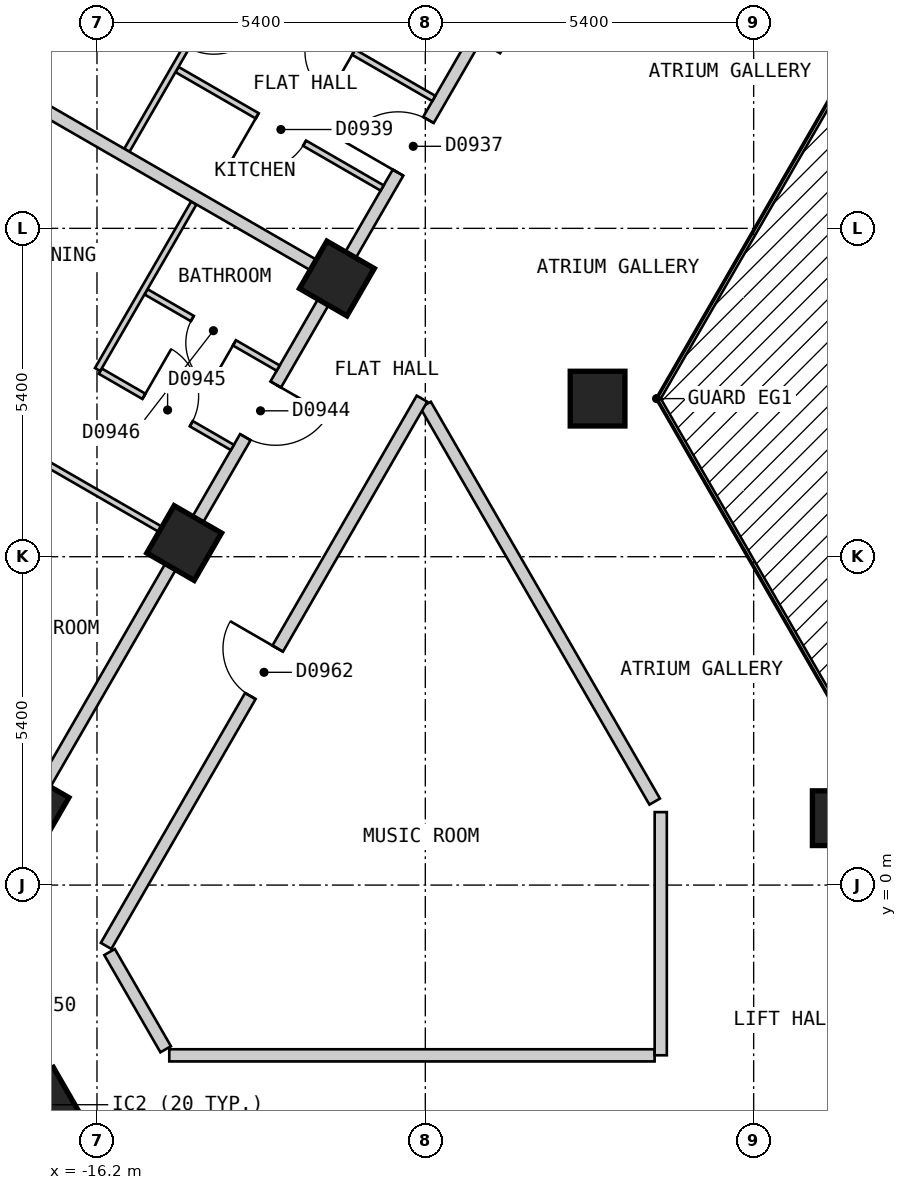
"""IFC4 building model, lengths in metres.
Left out: names, types, materials, properties, quantities, classifications, styles, units other than length and angle.
Written with IfcOpenShell. Run it as: python <this file> out.ifc"""

import sys

from ifc_helpers import new_model, si_unit, direction, frame, frame_2d, origin, origin_2d, place, context, subcontext, project, spatial, polyline, rectangle, outline, extrude, element, fill, save


model = new_model("IFC4")
c1 = context("Model", 3, precision=1e-05, world=origin(), true_north=direction((0.0, 1.0)))
c2 = subcontext(c1, "Body", "Model", "MODEL_VIEW")
j1 = project(units=[si_unit("LENGTHUNIT", "METRE"), si_unit("PLANEANGLEUNIT", "RADIAN")], contexts=[c1])
p1 = place(None, origin())
s1 = spatial("IfcSite", under=j1, at=p1, CompositionType="ELEMENT")
p2 = place(p1, origin())
s2 = spatial("IfcBuilding", under=s1, at=p2, CompositionType="ELEMENT")
p3 = place(p2, frame((0.0, 0.0, 102.0)))
s3 = spatial("IfcBuildingStorey", under=s2, at=p3, CompositionType="ELEMENT", Elevation=102.0)
for number, where, z_axis, x_axis in (
    (1, (-17.083, -3.612, 0.0), (0.0, 0.0, 1.0), (0.5, -0.866, 0.0)),
    (2, (-7.967, 8.0, 0.0), (0.0, 0.0, 1.0), (1.0, 0.0, 0.0)),
    (3, (-12.254, 9.975, 0.0), (0.0, 0.0, 1.0), (-0.5, -0.866, 0.0)),
    (4, (-14.766, 5.625, 0.0), (0.0, 0.0, 1.0), (-0.5, -0.866, 0.0)),
    (5, (-3.984, 1.1, 0.0), (0.0, 0.0, 1.0), (1.0, 0.0, 0.0)),
    (6, (-17.277, 1.275, 0.0), (0.0, 0.0, 1.0), (-0.5, -0.866, 0.0)),
):
    element("IfcColumn", number, at=place(p3, frame(where, z_axis=z_axis, x_axis=x_axis)), inside=s3, PredefinedType="COLUMN", context=c2, shape_type="SweptSolid", body=[
        extrude(rectangle(XDim=0.9, YDim=0.9, at=origin_2d()), origin(), (0.0, 0.0, 1.0), 3.0),
    ])
p4 = place(p3, frame((-15.747, 24.425, 0.0), z_axis=(0.0, 0.0, 1.0), x_axis=(-0.500027479704, -0.866009537788, 0.0)))
e7 = element("IfcWall", 7, at=p4, inside=s3, PredefinedType="SOLIDWALL", context=c2, shape_type="SweptSolid", body=[
    extrude(outline(polyline([(0.0, -0.15), (26.559, -0.15), (26.478, 0.15), (0.08, 0.15), (0.0, -0.15)])), origin(), (0.0, 0.0, 1.0), 2.7),
])
p5 = place(p4, frame((2.483, 0.0, 0.15)))
e8 = element("IfcOpeningElement", 8, at=p5, cuts=e7, PredefinedType="OPENING", context=c2, shape_type="SweptSolid", body=[
    extrude(rectangle(XDim=1.5, YDim=2.1, at=frame_2d((0.75, 1.05))), frame((0.0, 0.16, 0.0), z_axis=(0.0, -1.0, 0.0), x_axis=(1.0, 0.0, 0.0)), (0.0, 0.0, 1.0), 0.32),
])
p6 = place(p4, frame((7.506, 0.0, 0.15)))
e9 = element("IfcOpeningElement", 9, at=p6, cuts=e7, PredefinedType="OPENING", context=c2, shape_type="SweptSolid", body=[
    extrude(rectangle(XDim=1.5, YDim=2.1, at=frame_2d((0.75, 1.05))), frame((0.0, 0.16, 0.0), z_axis=(0.0, -1.0, 0.0), x_axis=(1.0, 0.0, 0.0)), (0.0, 0.0, 1.0), 0.32),
])
p7 = place(p4, frame((12.529, 0.0, 0.15)))
e10 = element("IfcOpeningElement", 10, at=p7, cuts=e7, PredefinedType="OPENING", context=c2, shape_type="SweptSolid", body=[
    extrude(rectangle(XDim=1.5, YDim=2.1, at=frame_2d((0.75, 1.05))), frame((0.0, 0.16, 0.0), z_axis=(0.0, -1.0, 0.0), x_axis=(1.0, 0.0, 0.0)), (0.0, 0.0, 1.0), 0.32),
])
p8 = place(p4, frame((17.552, 0.0, 0.15)))
e11 = element("IfcOpeningElement", 11, at=p8, cuts=e7, PredefinedType="OPENING", context=c2, shape_type="SweptSolid", body=[
    extrude(rectangle(XDim=1.5, YDim=2.1, at=frame_2d((0.75, 1.05))), frame((0.0, 0.16, 0.0), z_axis=(0.0, -1.0, 0.0), x_axis=(1.0, 0.0, 0.0)), (0.0, 0.0, 1.0), 0.32),
])
p9 = place(p4, frame((22.575, 0.0, 0.15)))
e12 = element("IfcOpeningElement", 12, at=p9, cuts=e7, PredefinedType="OPENING", context=c2, shape_type="SweptSolid", body=[
    extrude(rectangle(XDim=1.5, YDim=2.1, at=frame_2d((0.75, 1.05))), frame((0.0, 0.16, 0.0), z_axis=(0.0, -1.0, 0.0), x_axis=(1.0, 0.0, 0.0)), (0.0, 0.0, 1.0), 0.32),
])
p10 = place(p3, frame((-10.796, 7.899, 0.0), z_axis=(0.0, 0.0, 1.0), x_axis=(0.500010383074, -0.866019409031, 0.0)))
e13 = element("IfcWall", 13, at=p10, inside=s3, PredefinedType="PARTITIONING", context=c2, shape_type="SweptSolid", body=[
    extrude(rectangle(XDim=7.535, YDim=0.2, at=frame_2d((3.768, 0.0))), origin(), (0.0, 0.0, 1.0), 2.7),
])
p11 = place(p3, frame((-15.993, -1.101, 0.0), z_axis=(0.0, 0.0, 1.0), x_axis=(0.499894174133, -0.866086493757, 0.0)))
e14 = element("IfcWall", 14, at=p11, inside=s3, PredefinedType="PARTITIONING", context=c2, shape_type="SweptSolid", body=[
    extrude(rectangle(XDim=1.846, YDim=0.2, at=frame_2d((0.923, 0.0))), origin(), (0.0, 0.0, 1.0), 2.7),
])
p12 = place(p3, frame((-18.533, -1.101, 0.0), z_axis=(0.0, 0.0, 1.0), x_axis=(0.500022085096, -0.866012652573, 0.0)))
e15 = element("IfcWall", 15, at=p12, inside=s3, PredefinedType="PARTITIONING", context=c2, shape_type="SweptSolid", body=[
    extrude(rectangle(XDim=6.066, YDim=0.2, at=frame_2d((3.033, 0.0))), origin(), (0.0, 0.0, 1.0), 2.7),
])
p13 = place(p12, frame((0.532, 0.0, 0.0)))
e16 = element("IfcOpeningElement", 16, at=p13, cuts=e15, PredefinedType="OPENING", context=c2, shape_type="SweptSolid", body=[
    extrude(rectangle(XDim=1.0, YDim=2.1, at=frame_2d((0.5, 1.05))), frame((0.0, 0.11, 0.0), z_axis=(0.0, -1.0, 0.0), x_axis=(1.0, 0.0, 0.0)), (0.0, 0.0, 1.0), 0.22),
])
p14 = place(p3, frame((-15.011, -2.8, 0.0), z_axis=(0.0, 0.0, 1.0), x_axis=(1.0, 0.0, 0.0)))
e17 = element("IfcWall", 17, at=p14, inside=s3, PredefinedType="PARTITIONING", context=c2, shape_type="SweptSolid", body=[
    extrude(rectangle(XDim=7.982, YDim=0.2, at=frame_2d((3.991, 0.0))), origin(), (0.0, 0.0, 1.0), 2.7),
])
p15 = place(p3, frame((-16.05, -1.0, 0.0), z_axis=(0.0, 0.0, 1.0), x_axis=(0.499962449088, 0.866047082728, 0.0)))
e18 = element("IfcWall", 18, at=p15, inside=s3, PredefinedType="PARTITIONING", context=c2, shape_type="SweptSolid", body=[
    extrude(rectangle(XDim=10.391, YDim=0.2, at=frame_2d((5.195, 0.0))), origin(), (0.0, 0.0, 1.0), 2.7),
])
p16 = place(p15, frame((4.745, 0.0, 0.0)))
e19 = element("IfcOpeningElement", 19, at=p16, cuts=e18, PredefinedType="OPENING", context=c2, shape_type="SweptSolid", body=[
    extrude(rectangle(XDim=0.9, YDim=2.1, at=frame_2d((0.45, 1.05))), frame((0.0, 0.11, 0.0), z_axis=(0.0, -1.0, 0.0), x_axis=(1.0, 0.0, 0.0)), (0.0, 0.0, 1.0), 0.22),
])
p17 = place(p3, frame((-18.562, -0.951, 0.0), z_axis=(0.0, 0.0, 1.0), x_axis=(0.499987097491, 0.866032852923, 0.0)))
e20 = element("IfcWall", 20, at=p17, inside=s3, PredefinedType="PARTITIONING", context=c2, shape_type="SweptSolid", body=[
    extrude(rectangle(XDim=20.15, YDim=0.2, at=frame_2d((10.075, 0.0))), origin(), (0.0, 0.0, 1.0), 2.7),
])
p18 = place(p17, frame((14.627, 0.0, 0.0)))
e21 = element("IfcOpeningElement", 21, at=p18, cuts=e20, PredefinedType="OPENING", context=c2, shape_type="SweptSolid", body=[
    extrude(rectangle(XDim=1.0, YDim=2.1, at=frame_2d((0.5, 1.05))), frame((0.0, 0.11, 0.0), z_axis=(0.0, -1.0, 0.0), x_axis=(1.0, 0.0, 0.0)), (0.0, 0.0, 1.0), 0.22),
])
p19 = place(p17, frame((9.604, 0.0, 0.0)))
e22 = element("IfcOpeningElement", 22, at=p19, cuts=e20, PredefinedType="OPENING", context=c2, shape_type="SweptSolid", body=[
    extrude(rectangle(XDim=1.0, YDim=2.1, at=frame_2d((0.5, 1.05))), frame((0.0, 0.11, 0.0), z_axis=(0.0, -1.0, 0.0), x_axis=(1.0, 0.0, 0.0)), (0.0, 0.0, 1.0), 0.22),
])
p20 = place(p3, frame((-6.928, -2.799, 0.0), z_axis=(0.0, 0.0, 1.0), x_axis=(0.0, 1.0, 0.0)))
e23 = element("IfcWall", 23, at=p20, inside=s3, PredefinedType="PARTITIONING", context=c2, shape_type="SweptSolid", body=[
    extrude(rectangle(XDim=3.999, YDim=0.2, at=frame_2d((2.0, 0.0))), origin(), (0.0, 0.0, 1.0), 2.7),
])
p21 = place(p3, frame((-16.146, 8.452, 0.0), z_axis=(0.0, 0.0, 1.0), x_axis=(0.865983051302, -0.500073349477, 0.0)))
e24 = element("IfcWall", 24, at=p21, inside=s3, PredefinedType="PARTITIONING", context=c2, shape_type="SweptSolid", body=[
    extrude(rectangle(XDim=2.509, YDim=0.1, at=frame_2d((1.255, 0.0))), origin(), (0.0, 0.0, 1.0), 2.7),
])
p22 = place(p21, frame((0.829, 0.0, 0.0)))
e25 = element("IfcOpeningElement", 25, at=p22, cuts=e24, PredefinedType="OPENING", context=c2, shape_type="SweptSolid", body=[
    extrude(rectangle(XDim=0.9, YDim=2.1, at=frame_2d((0.45, 1.05))), frame((0.0, 0.06, 0.0), z_axis=(0.0, -1.0, 0.0), x_axis=(1.0, 0.0, 0.0)), (0.0, 0.0, 1.0), 0.12),
])
p23 = place(p3, frame((-23.513, 10.675, 0.0), z_axis=(0.0, 0.0, 1.0), x_axis=(0.866041268327, -0.499972520799, 0.0)))
e26 = element("IfcWall", 26, at=p23, inside=s3, PredefinedType="PARTITIONING", context=c2, shape_type="SweptSolid", body=[
    extrude(rectangle(XDim=10.0, YDim=0.1, at=frame_2d((5.0, 0.0))), origin(), (0.0, 0.0, 1.0), 2.7),
])
p24 = place(p23, frame((4.325, 0.0, 0.0)))
e27 = element("IfcOpeningElement", 27, at=p24, cuts=e26, PredefinedType="OPENING", context=c2, shape_type="SweptSolid", body=[
    extrude(rectangle(XDim=0.9, YDim=2.1, at=frame_2d((0.45, 1.05))), frame((0.0, 0.06, 0.0), z_axis=(0.0, -1.0, 0.0), x_axis=(1.0, 0.0, 0.0)), (0.0, 0.0, 1.0), 0.12),
])
p25 = place(p3, frame((-14.884, 13.412, 0.0), z_axis=(0.0, 0.0, 1.0), x_axis=(0.866024880635, -0.500000906121, 0.0)))
e28 = element("IfcWall", 28, at=p25, inside=s3, PredefinedType="PARTITIONING", context=c2, shape_type="SweptSolid", body=[
    extrude(rectangle(XDim=3.896, YDim=0.1, at=frame_2d((1.948, 0.0))), origin(), (0.0, 0.0, 1.0), 2.7),
])
p26 = place(p25, frame((1.523, 0.0, 0.0)))
e29 = element("IfcOpeningElement", 29, at=p26, cuts=e28, PredefinedType="OPENING", context=c2, shape_type="SweptSolid", body=[
    extrude(rectangle(XDim=0.9, YDim=2.1, at=frame_2d((0.45, 1.05))), frame((0.0, 0.06, 0.0), z_axis=(0.0, -1.0, 0.0), x_axis=(1.0, 0.0, 0.0)), (0.0, 0.0, 1.0), 0.12),
])
p27 = place(p3, frame((-14.034, 14.884, 0.0), z_axis=(0.0, 0.0, 1.0), x_axis=(0.866024880635, -0.500000906121, 0.0)))
e30 = element("IfcWall", 30, at=p27, inside=s3, PredefinedType="PARTITIONING", context=c2, shape_type="SweptSolid", body=[
    extrude(rectangle(XDim=3.896, YDim=0.1, at=frame_2d((1.948, 0.0))), origin(), (0.0, 0.0, 1.0), 2.7),
])
p28 = place(p27, frame((1.573, 0.0, 0.0)))
e31 = element("IfcOpeningElement", 31, at=p28, cuts=e30, PredefinedType="OPENING", context=c2, shape_type="SweptSolid", body=[
    extrude(rectangle(XDim=0.8, YDim=2.1, at=frame_2d((0.4, 1.05))), frame((0.0, 0.06, 0.0), z_axis=(0.0, -1.0, 0.0), x_axis=(1.0, 0.0, 0.0)), (0.0, 0.0, 1.0), 0.12),
])
p29 = place(p3, frame((-15.394, 9.757, 0.0), z_axis=(0.0, 0.0, 1.0), x_axis=(0.866038211682, -0.499977815414, 0.0)))
e32 = element("IfcWall", 32, at=p29, inside=s3, PredefinedType="PARTITIONING", context=c2, shape_type="SweptSolid", body=[
    extrude(rectangle(XDim=2.51, YDim=0.1, at=frame_2d((1.255, 0.0))), origin(), (0.0, 0.0, 1.0), 2.7),
])
p30 = place(p29, frame((0.88, 0.0, 0.0)))
e33 = element("IfcOpeningElement", 33, at=p30, cuts=e32, PredefinedType="OPENING", context=c2, shape_type="SweptSolid", body=[
    extrude(rectangle(XDim=0.8, YDim=2.1, at=frame_2d((0.4, 1.05))), frame((0.0, 0.06, 0.0), z_axis=(0.0, -1.0, 0.0), x_axis=(1.0, 0.0, 0.0)), (0.0, 0.0, 1.0), 0.12),
])
p31 = place(p3, frame((-16.19, 8.478, 0.0), z_axis=(0.0, 0.0, 1.0), x_axis=(0.500156715107, 0.865934905367, 0.0)))
e34 = element("IfcWall", 34, at=p31, inside=s3, PredefinedType="PARTITIONING", context=c2, shape_type="SweptSolid", body=[
    extrude(rectangle(XDim=3.163, YDim=0.1, at=frame_2d((1.582, 0.0))), origin(), (0.0, 0.0, 1.0), 2.7),
])
p32 = place(p3, frame((-15.708, 12.085, 0.0), z_axis=(0.0, 0.0, 1.0), x_axis=(0.499943653708, 0.866057932887, 0.0)))
e35 = element("IfcWall", 35, at=p32, inside=s3, PredefinedType="PARTITIONING", context=c2, shape_type="SweptSolid", body=[
    extrude(rectangle(XDim=4.873, YDim=0.1, at=frame_2d((2.436, 0.0))), origin(), (0.0, 0.0, 1.0), 2.7),
])
p33 = place(p32, frame((1.962, 0.0, 0.0)))
e36 = element("IfcOpeningElement", 36, at=p33, cuts=e35, PredefinedType="OPENING", context=c2, shape_type="SweptSolid", body=[
    extrude(rectangle(XDim=0.9, YDim=2.1, at=frame_2d((0.45, 1.05))), frame((0.0, 0.06, 0.0), z_axis=(0.0, -1.0, 0.0), x_axis=(1.0, 0.0, 0.0)), (0.0, 0.0, 1.0), 0.12),
])
p34 = place(p3, frame((-21.001, 15.025, 0.0), z_axis=(0.0, 0.0, 1.0), x_axis=(0.866016855193, -0.500014806302, 0.0)))
e37 = element("IfcWall", 37, at=p34, inside=s3, PredefinedType="PARTITIONING", context=c2, shape_type="SweptSolid", body=[
    extrude(rectangle(XDim=10.0, YDim=0.2, at=frame_2d((5.0, 0.0))), origin(), (0.0, 0.0, 1.0), 2.7),
])
p35 = place(p18, origin())
e38 = element("IfcDoor", 38, at=p35, inside=s3, OperationType="SINGLE_SWING_LEFT", PredefinedType="DOOR", context=c2, shape_type="SweptSolid", body=[
    extrude(rectangle(XDim=1.0, YDim=2.1, at=frame_2d((0.5, 1.05))), frame((0.0, 0.025, 0.0), z_axis=(0.0, -1.0, 0.0), x_axis=(1.0, 0.0, 0.0)), (0.0, 0.0, 1.0), 0.05),
])
fill(e21, e38)
p36 = place(p28, origin())
e39 = element("IfcDoor", 39, at=p36, inside=s3, OperationType="SINGLE_SWING_RIGHT", PredefinedType="DOOR", context=c2, shape_type="SweptSolid", body=[
    extrude(rectangle(XDim=0.8, YDim=2.1, at=frame_2d((0.4, 1.05))), frame((0.0, 0.025, 0.0), z_axis=(0.0, -1.0, 0.0), x_axis=(1.0, 0.0, 0.0)), (0.0, 0.0, 1.0), 0.05),
])
fill(e31, e39)
p37 = place(p26, origin())
e40 = element("IfcDoor", 40, at=p37, inside=s3, OperationType="SINGLE_SWING_LEFT", PredefinedType="DOOR", context=c2, shape_type="SweptSolid", body=[
    extrude(rectangle(XDim=0.9, YDim=2.1, at=frame_2d((0.45, 1.05))), frame((0.0, 0.025, 0.0), z_axis=(0.0, -1.0, 0.0), x_axis=(1.0, 0.0, 0.0)), (0.0, 0.0, 1.0), 0.05),
])
fill(e29, e40)
p38 = place(p19, origin())
e41 = element("IfcDoor", 41, at=p38, inside=s3, OperationType="SINGLE_SWING_RIGHT", PredefinedType="DOOR", context=c2, shape_type="SweptSolid", body=[
    extrude(rectangle(XDim=1.0, YDim=2.1, at=frame_2d((0.5, 1.05))), frame((0.0, 0.025, 0.0), z_axis=(0.0, -1.0, 0.0), x_axis=(1.0, 0.0, 0.0)), (0.0, 0.0, 1.0), 0.05),
])
fill(e22, e41)
p39 = place(p22, origin())
e42 = element("IfcDoor", 42, at=p39, inside=s3, OperationType="SINGLE_SWING_LEFT", PredefinedType="DOOR", context=c2, shape_type="SweptSolid", body=[
    extrude(rectangle(XDim=0.9, YDim=2.1, at=frame_2d((0.45, 1.05))), frame((0.0, 0.025, 0.0), z_axis=(0.0, -1.0, 0.0), x_axis=(1.0, 0.0, 0.0)), (0.0, 0.0, 1.0), 0.05),
])
fill(e25, e42)
p40 = place(p30, origin())
e43 = element("IfcDoor", 43, at=p40, inside=s3, OperationType="SINGLE_SWING_RIGHT", PredefinedType="DOOR", context=c2, shape_type="SweptSolid", body=[
    extrude(rectangle(XDim=0.8, YDim=2.1, at=frame_2d((0.4, 1.05))), frame((0.0, 0.025, 0.0), z_axis=(0.0, -1.0, 0.0), x_axis=(1.0, 0.0, 0.0)), (0.0, 0.0, 1.0), 0.05),
])
fill(e33, e43)
p41 = place(p16, origin())
e44 = element("IfcDoor", 44, at=p41, inside=s3, OperationType="SINGLE_SWING_RIGHT", PredefinedType="DOOR", context=c2, shape_type="SweptSolid", body=[
    extrude(rectangle(XDim=0.9, YDim=2.1, at=frame_2d((0.45, 1.05))), frame((0.0, 0.025, 0.0), z_axis=(0.0, -1.0, 0.0), x_axis=(1.0, 0.0, 0.0)), (0.0, 0.0, 1.0), 0.05),
])
fill(e19, e44)
save(model, sys.argv[1])
